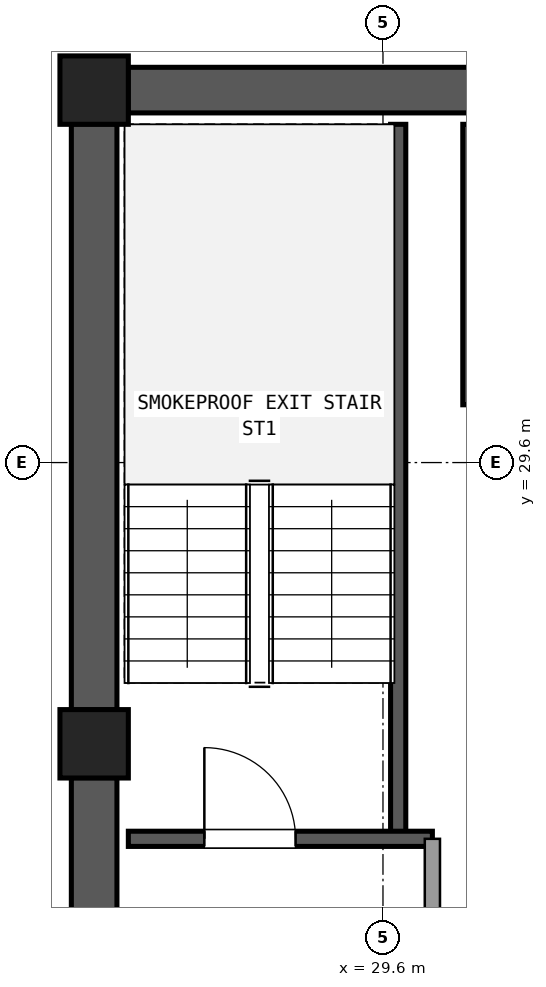
"""IFC4 building model, lengths in metres.
Left out: names, types, materials, properties, quantities, classifications, styles, units other than length and angle.
Written with IfcOpenShell. Run it as: python <this file> out.ifc"""

import sys

from ifc_helpers import new_model, si_unit, direction, frame, frame_2d, origin, origin_2d, place, context, subcontext, project, spatial, rectangle, extrude, element, fill, save


model = new_model("IFC4")
c1 = context("Model", 3, precision=1e-05, world=origin(), true_north=direction((0.0, 1.0)))
c2 = subcontext(c1, "Body", "Model", "MODEL_VIEW")
j1 = project(units=[si_unit("LENGTHUNIT", "METRE"), si_unit("PLANEANGLEUNIT", "RADIAN")], contexts=[c1])
p1 = place(None, origin())
s1 = spatial("IfcSite", under=j1, at=p1, CompositionType="ELEMENT")
p2 = place(p1, origin())
s2 = spatial("IfcBuilding", under=s1, at=p2, CompositionType="ELEMENT")
p3 = place(p2, frame((0.0, 0.0, 192.78)))
s3 = spatial("IfcBuildingStorey", under=s2, at=p3, CompositionType="ELEMENT", Elevation=192.78)
for number, where, z_axis, x_axis in (
    (1, (25.8, 34.5, 0.0), (0.0, 0.0, 1.0), (1.0, 0.0, 0.0)),
    (2, (25.8, 25.9, 0.0), (0.0, 0.0, 1.0), (1.0, 0.0, 0.0)),
):
    element("IfcColumn", number, at=place(p3, frame(where, z_axis=z_axis, x_axis=x_axis)), inside=s3, PredefinedType="COLUMN", context=c2, shape_type="SweptSolid", body=[
        extrude(rectangle(XDim=0.9, YDim=0.9, at=origin_2d()), origin(), (0.0, 0.0, 1.0), 3.6),
    ])
p4 = place(p3, frame((36.555, 34.5, 0.0), z_axis=(0.0, 0.0, 1.0), x_axis=(-1.0, 0.0, 0.0)))
e3 = element("IfcWall", 3, at=p4, inside=s3, PredefinedType="SHEAR", context=c2, shape_type="SweptSolid", body=[
    extrude(rectangle(XDim=10.31, YDim=0.6, at=frame_2d((5.155, 0.0))), origin(), (0.0, 0.0, 1.0), 3.32),
])
p5 = place(p4, frame((4.155, 0.0, 0.0)))
e4 = element("IfcOpeningElement", 4, at=p5, cuts=e3, PredefinedType="OPENING", context=c2, shape_type="SweptSolid", body=[
    extrude(rectangle(XDim=1.2, YDim=2.15, at=frame_2d((0.6, 1.075))), frame((0.0, 0.31, 0.0), z_axis=(0.0, -1.0, 0.0), x_axis=(1.0, 0.0, 0.0)), (0.0, 0.0, 1.0), 0.62),
])
p6 = place(p3, frame((25.8, 34.055, 0.0), z_axis=(0.0, 0.0, 1.0), x_axis=(0.0, -1.0, 0.0)))
e5 = element("IfcWall", 5, at=p6, inside=s3, PredefinedType="SHEAR", context=c2, shape_type="SweptSolid", body=[
    extrude(rectangle(XDim=7.71, YDim=0.6, at=frame_2d((3.855, 0.0))), origin(), (0.0, 0.0, 1.0), 3.32),
])
p7 = place(p3, frame((25.8, 25.455, 0.0), z_axis=(0.0, 0.0, 1.0), x_axis=(0.0, -1.0, 0.0)))
e6 = element("IfcWall", 6, at=p7, inside=s3, PredefinedType="SHEAR", context=c2, shape_type="SweptSolid", body=[
    extrude(rectangle(XDim=7.71, YDim=0.6, at=frame_2d((3.855, 0.0))), origin(), (0.0, 0.0, 1.0), 3.32),
])
p8 = place(p7, frame((2.205, 0.0, 0.0)))
e7 = element("IfcOpeningElement", 7, at=p8, cuts=e6, PredefinedType="OPENING", context=c2, shape_type="SweptSolid", body=[
    extrude(rectangle(XDim=1.2, YDim=2.15, at=frame_2d((0.6, 1.075))), frame((0.0, 0.31, 0.0), z_axis=(0.0, -1.0, 0.0), x_axis=(1.0, 0.0, 0.0)), (0.0, 0.0, 1.0), 0.62),
])
p9 = place(p3, frame((29.8, 24.65, 0.0), z_axis=(0.0, 0.0, 1.0), x_axis=(0.0, 1.0, 0.0)))
e8 = element("IfcWall", 8, at=p9, inside=s3, PredefinedType="SHEAR", context=c2, shape_type="SweptSolid", body=[
    extrude(rectangle(XDim=9.4, YDim=0.2, at=frame_2d((4.7, 0.0))), origin(), (0.0, 0.0, 1.0), 3.32),
])
p10 = place(p3, frame((26.25, 24.65, 0.0), z_axis=(0.0, 0.0, 1.0), x_axis=(1.0, 0.0, 0.0)))
e9 = element("IfcWall", 9, at=p10, inside=s3, PredefinedType="SHEAR", context=c2, shape_type="SweptSolid", body=[
    extrude(rectangle(XDim=4.0, YDim=0.2, at=frame_2d((2.0, 0.0))), origin(), (0.0, 0.0, 1.0), 3.32),
])
p11 = place(p10, frame((1.0, 0.0, 0.0)))
e10 = element("IfcOpeningElement", 10, at=p11, cuts=e9, PredefinedType="OPENING", context=c2, shape_type="SweptSolid", body=[
    extrude(rectangle(XDim=1.2, YDim=2.15, at=frame_2d((0.6, 1.075))), frame((0.0, 0.11, 0.0), z_axis=(0.0, -1.0, 0.0), x_axis=(1.0, 0.0, 0.0)), (0.0, 0.0, 1.0), 0.22),
])
p12 = place(p3, frame((30.75, 30.36, 0.0), z_axis=(0.0, 0.0, 1.0), x_axis=(0.0, 1.0, 0.0)))
e11 = element("IfcWall", 11, at=p12, inside=s3, PredefinedType="SHEAR", context=c2, shape_type="SweptSolid", body=[
    extrude(rectangle(XDim=3.69, YDim=0.2, at=frame_2d((1.845, 0.0))), origin(), (0.0, 0.0, 1.0), 3.32),
])
p13 = place(p3, frame((30.25, 17.75, 0.0), z_axis=(0.0, 0.0, 1.0), x_axis=(0.0, 1.0, 0.0)))
e12 = element("IfcWall", 12, at=p13, inside=s3, PredefinedType="SOLIDWALL", context=c2, shape_type="SweptSolid", body=[
    extrude(rectangle(XDim=6.9, YDim=0.2, at=frame_2d((3.45, 0.0))), origin(), (0.0, 0.0, 1.0), 2.61),
])
p14 = place(p13, frame((4.15, 0.0, 0.0)))
e13 = element("IfcOpeningElement", 13, at=p14, cuts=e12, PredefinedType="OPENING", context=c2, shape_type="SweptSolid", body=[
    extrude(rectangle(XDim=1.2, YDim=2.15, at=frame_2d((0.6, 1.075))), frame((0.0, 0.11, 0.0), z_axis=(0.0, -1.0, 0.0), x_axis=(1.0, 0.0, 0.0)), (0.0, 0.0, 1.0), 0.22),
])
p15 = place(p11, origin())
e14 = element("IfcDoor", 14, at=p15, inside=s3, OperationType="SINGLE_SWING_LEFT", PredefinedType="DOOR", context=c2, shape_type="SweptSolid", body=[
    extrude(rectangle(XDim=1.2, YDim=2.15, at=frame_2d((0.6, 1.075))), frame((0.0, 0.025, 0.0), z_axis=(0.0, -1.0, 0.0), x_axis=(1.0, 0.0, 0.0)), (0.0, 0.0, 1.0), 0.05),
])
fill(e10, e14)
save(model, sys.argv[1])
